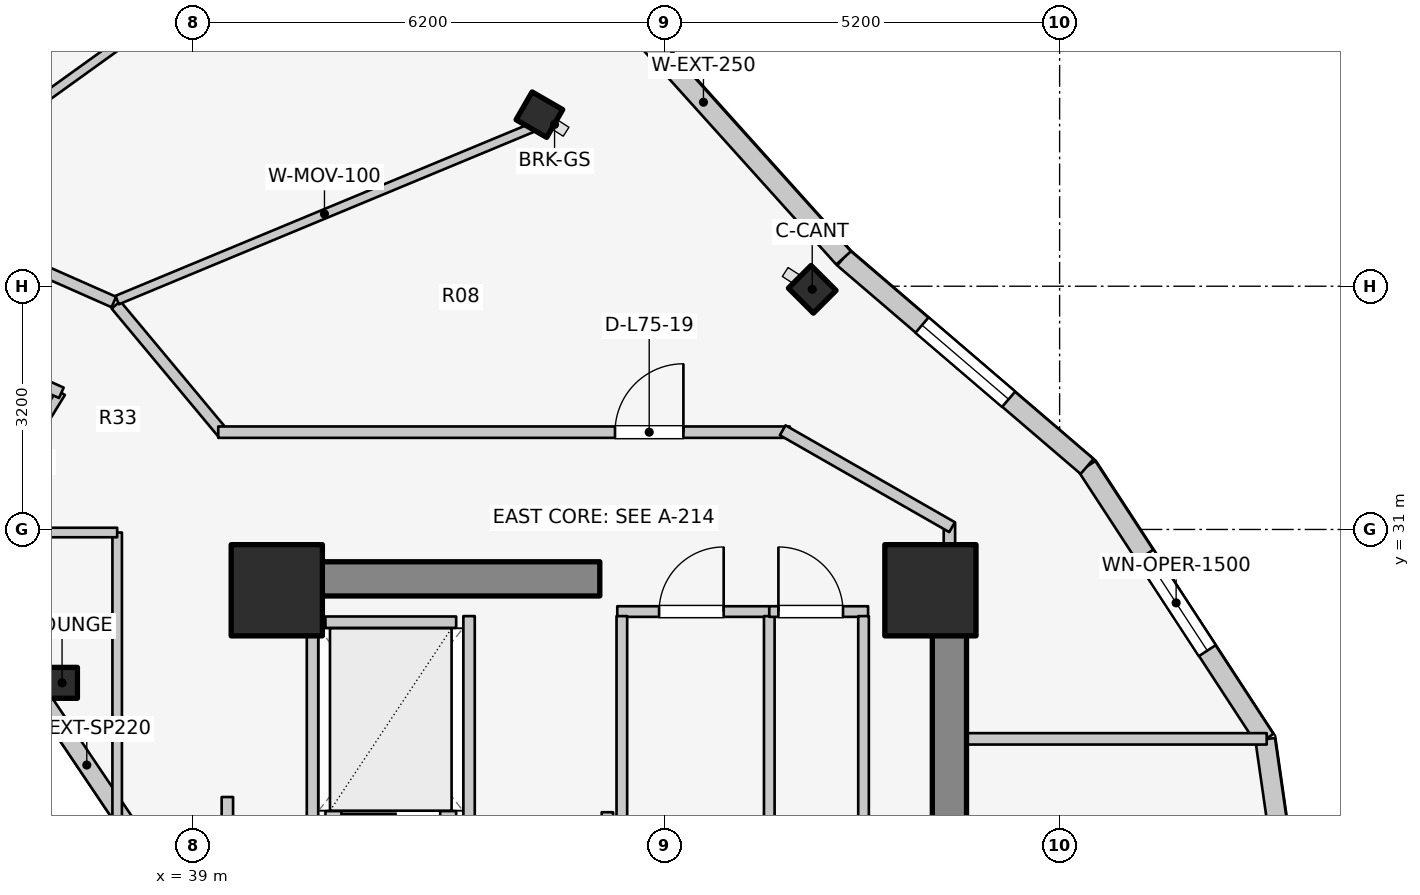
"""IFC4 building model, lengths in metres.
Left out: names, types, materials, properties, quantities, classifications, styles, units other than length and angle.
Written with IfcOpenShell. Run it as: python <this file> out.ifc"""

import sys

from ifc_helpers import new_model, si_unit, direction, frame, frame_2d, origin, origin_2d, place, context, subcontext, project, spatial, rectangle, i_section, extrude, element, fill, save


model = new_model("IFC4")
c1 = context("Model", 3, precision=1e-05, world=origin(), true_north=direction((0.0, 1.0)))
c2 = subcontext(c1, "Body", "Model", "MODEL_VIEW")
j1 = project(units=[si_unit("LENGTHUNIT", "METRE"), si_unit("PLANEANGLEUNIT", "RADIAN")], contexts=[c1])
p1 = place(None, origin())
s1 = spatial("IfcSite", under=j1, at=p1, CompositionType="ELEMENT")
p2 = place(p1, origin())
s2 = spatial("IfcBuilding", under=s1, at=p2, CompositionType="ELEMENT")
p3 = place(p2, frame((0.0, 0.0, 246.0)))
s3 = spatial("IfcBuildingStorey", under=s2, at=p3, CompositionType="ELEMENT", Elevation=246.0)
p4 = place(p3, frame((48.95, 17.05, 0.0), z_axis=(0.0, 0.0, 1.0), x_axis=(0.0, 1.0, 0.0)))
e1 = element("IfcWall", 1, at=p4, inside=s3, PredefinedType="SHEAR", context=c2, shape_type="SweptSolid", body=[
    extrude(rectangle(XDim=12.8, YDim=0.45, at=frame_2d((6.4, 0.0))), origin(), (0.0, 0.0, 1.0), 3.6),
])
p5 = place(p3, frame((39.85, 30.35, 0.0), z_axis=(0.0, 0.0, 1.0), x_axis=(1.0, 0.0, 0.0)))
e2 = element("IfcWall", 2, at=p5, inside=s3, PredefinedType="SHEAR", context=c2, shape_type="SweptSolid", body=[
    extrude(rectangle(XDim=4.5, YDim=0.45, at=frame_2d((2.25, 0.0))), origin(), (0.0, 0.0, 1.0), 3.6),
])
for number, where, z_axis, x_axis in (
    (3, (48.7, 30.2, 0.0), (0.0, 0.0, 1.0), (1.0, 0.0, 0.0)),
    (4, (40.1, 30.2, 0.0), (0.0, 0.0, 1.0), (1.0, 0.0, 0.0)),
):
    element("IfcColumn", number, at=place(p3, frame(where, z_axis=z_axis, x_axis=x_axis)), inside=s3, PredefinedType="COLUMN", context=c2, shape_type="SweptSolid", body=[
        extrude(rectangle(XDim=1.2, YDim=1.2, at=origin_2d()), origin(), (0.0, 0.0, 1.0), 3.6),
    ])
p6 = place(p3, frame((37.275, 28.982, 0.0), z_axis=(0.0, 0.0, 1.0), x_axis=(1.0, 0.0, 0.0)))
e5 = element("IfcColumn", 5, at=p6, inside=s3, PredefinedType="COLUMN", context=c2, shape_type="SweptSolid", body=[
    extrude(i_section(OverallWidth=0.404, OverallDepth=0.407, WebThickness=0.027, FlangeThickness=0.044, FilletRadius=0.025, at=origin_2d()), origin(), (0.0, 0.0, 1.0), 3.6),
])
for number, where, z_axis, x_axis in (
    (6, (47.145, 34.159, 0.0), (0.0, 0.0, 1.0), (0.707, 0.707, 0.0)),
    (7, (43.555, 36.457, 0.0), (0.0, 0.0, 1.0), (0.5, 0.866, 0.0)),
):
    element("IfcColumn", number, at=place(p3, frame(where, z_axis=z_axis, x_axis=x_axis)), inside=s3, PredefinedType="COLUMN", context=c2, shape_type="SweptSolid", body=[
        extrude(i_section(OverallWidth=0.422, OverallDepth=0.465, WebThickness=0.045, FlangeThickness=0.073, FilletRadius=0.025, at=origin_2d()), origin(), (0.0, 0.0, 1.0), 3.6),
    ])
p7 = place(p3, frame((38.166, 27.06, 0.0), z_axis=(0.0, 0.0, 1.0), x_axis=(-0.558197800898, 0.829707909492, 0.0)))
e8 = element("IfcWall", 8, at=p7, inside=s3, PredefinedType="STANDARD", context=c2, shape_type="SweptSolid", body=[
    extrude(rectangle(XDim=2.027, YDim=0.23, at=frame_2d((1.013, 0.0))), origin(), (0.0, 0.0, 1.0), 2.6),
])
p8 = place(p3, frame((53.86, 23.0, 0.0), z_axis=(0.0, 0.0, 1.0), x_axis=(-0.142712754019, 0.989764148593, 0.0)))
e9 = element("IfcWall", 9, at=p8, inside=s3, PredefinedType="STANDARD", context=c2, shape_type="SweptSolid", body=[
    extrude(rectangle(XDim=5.293, YDim=0.26, at=frame_2d((2.646, 0.0))), origin(), (0.0, 0.0, 1.0), 3.29),
])
p9 = place(p8, frame((1.447, 0.0, 0.75)))
e10 = element("IfcOpeningElement", 10, at=p9, cuts=e9, PredefinedType="OPENING", context=c2, shape_type="SweptSolid", body=[
    extrude(rectangle(XDim=2.4, YDim=1.7, at=frame_2d((1.2, 0.85))), frame((0.0, 0.14, 0.0), z_axis=(0.0, -1.0, 0.0), x_axis=(1.0, 0.0, 0.0)), (0.0, 0.0, 1.0), 0.28),
])
p10 = place(p3, frame((53.105, 28.239, 0.0), z_axis=(0.0, 0.0, 1.0), x_axis=(-0.546606419826, 0.837389647539, 0.0)))
e11 = element("IfcWall", 11, at=p10, inside=s3, PredefinedType="STANDARD", context=c2, shape_type="SweptSolid", body=[
    extrude(rectangle(XDim=4.288, YDim=0.26, at=frame_2d((2.144, 0.0))), origin(), (0.0, 0.0, 1.0), 3.29),
])
p11 = place(p10, frame((1.394, 0.0, 0.75)))
e12 = element("IfcOpeningElement", 12, at=p11, cuts=e11, PredefinedType="OPENING", context=c2, shape_type="SweptSolid", body=[
    extrude(rectangle(XDim=1.5, YDim=1.6, at=frame_2d((0.75, 0.8))), frame((0.0, 0.14, 0.0), z_axis=(0.0, -1.0, 0.0), x_axis=(1.0, 0.0, 0.0)), (0.0, 0.0, 1.0), 0.28),
])
p12 = place(p3, frame((50.761, 31.829, 0.0), z_axis=(0.0, 0.0, 1.0), x_axis=(-0.759587504333, 0.650405122413, 0.0)))
e13 = element("IfcWall", 13, at=p12, inside=s3, PredefinedType="STANDARD", context=c2, shape_type="SweptSolid", body=[
    extrude(rectangle(XDim=4.217, YDim=0.26, at=frame_2d((2.109, 0.0))), origin(), (0.0, 0.0, 1.0), 3.29),
])
p13 = place(p12, frame((1.359, 0.0, 0.75)))
e14 = element("IfcOpeningElement", 14, at=p13, cuts=e13, PredefinedType="OPENING", context=c2, shape_type="SweptSolid", body=[
    extrude(rectangle(XDim=1.5, YDim=1.6, at=frame_2d((0.75, 0.8))), frame((0.0, 0.14, 0.0), z_axis=(0.0, -1.0, 0.0), x_axis=(1.0, 0.0, 0.0)), (0.0, 0.0, 1.0), 0.28),
])
p14 = place(p3, frame((47.558, 34.572, 0.0), z_axis=(0.0, 0.0, 1.0), x_axis=(-0.668903560134, 0.743349196031, 0.0)))
e15 = element("IfcWall", 15, at=p14, inside=s3, PredefinedType="STANDARD", context=c2, shape_type="SweptSolid", body=[
    extrude(rectangle(XDim=5.513, YDim=0.26, at=frame_2d((2.756, 0.0))), origin(), (0.0, 0.0, 1.0), 3.29),
])
p15 = place(p3, frame((40.74, 27.22, 0.0), z_axis=(0.0, 0.0, 1.0), x_axis=(1.0, 0.0, 0.0)))
e16 = element("IfcWall", 16, at=p15, inside=s3, PredefinedType="SOLIDWALL", context=c2, shape_type="SweptSolid", body=[
    extrude(rectangle(XDim=1.72, YDim=0.15, at=frame_2d((0.86, 0.0))), origin(), (0.0, 0.0, 1.0), 3.295),
])
p16 = place(p15, frame((0.21, 0.0, 0.0)))
e17 = element("IfcOpeningElement", 17, at=p16, cuts=e16, PredefinedType="OPENING", context=c2, shape_type="SweptSolid", body=[
    extrude(rectangle(XDim=1.3, YDim=2.1, at=frame_2d((0.65, 1.05))), frame((0.0, 0.085, 0.0), z_axis=(0.0, -1.0, 0.0), x_axis=(1.0, 0.0, 0.0)), (0.0, 0.0, 1.0), 0.17),
])
p17 = place(p3, frame((40.74, 29.78, 0.0), z_axis=(0.0, 0.0, 1.0), x_axis=(1.0, 0.0, 0.0)))
e18 = element("IfcWall", 18, at=p17, inside=s3, PredefinedType="SOLIDWALL", context=c2, shape_type="SweptSolid", body=[
    extrude(rectangle(XDim=1.72, YDim=0.15, at=frame_2d((0.86, 0.0))), origin(), (0.0, 0.0, 1.0), 3.295),
])
for number, where, z_axis, x_axis in (
    (19, (40.57, 27.14, 0.0), (0.0, 0.0, 1.0), (0.0, 1.0, 0.0)),
    (20, (42.63, 27.14, 0.0), (0.0, 0.0, 1.0), (0.0, 1.0, 0.0)),
):
    element("IfcWall", number, at=place(p3, frame(where, z_axis=z_axis, x_axis=x_axis)), inside=s3, PredefinedType="SOLIDWALL", context=c2, shape_type="SweptSolid", body=[
        extrude(rectangle(XDim=2.72, YDim=0.15, at=frame_2d((1.36, 0.0))), origin(), (0.0, 0.0, 1.0), 3.295),
    ])
p18 = place(p3, frame((44.45, 24.08, 0.0), z_axis=(0.0, 0.0, 1.0), x_axis=(0.0, 1.0, 0.0)))
e21 = element("IfcWall", 21, at=p18, inside=s3, PredefinedType="PARTITIONING", context=c2, shape_type="SweptSolid", body=[
    extrude(rectangle(XDim=3.2, YDim=0.15, at=frame_2d((1.6, 0.0))), origin(), (0.0, 0.0, 1.0), 3.295),
])
p19 = place(p3, frame((39.45, 24.08, 0.0), z_axis=(0.0, 0.0, 1.0), x_axis=(0.0, 1.0, 0.0)))
e22 = element("IfcWall", 22, at=p19, inside=s3, PredefinedType="PARTITIONING", context=c2, shape_type="SweptSolid", body=[
    extrude(rectangle(XDim=3.4, YDim=0.15, at=frame_2d((1.7, 0.0))), origin(), (0.0, 0.0, 1.0), 3.295),
])
p20 = place(p19, frame((2.02, 0.0, 0.0)))
e23 = element("IfcOpeningElement", 23, at=p20, cuts=e22, PredefinedType="OPENING", context=c2, shape_type="SweptSolid", body=[
    extrude(rectangle(XDim=1.1, YDim=2.1, at=frame_2d((0.55, 1.05))), frame((0.0, 0.085, 0.0), z_axis=(0.0, -1.0, 0.0), x_axis=(1.0, 0.0, 0.0)), (0.0, 0.0, 1.0), 0.17),
])
p21 = place(p3, frame((44.58, 29.92, 0.0), z_axis=(0.0, 0.0, 1.0), x_axis=(1.0, 0.0, 0.0)))
e24 = element("IfcWall", 24, at=p21, inside=s3, PredefinedType="PLUMBINGWALL", context=c2, shape_type="SweptSolid", body=[
    extrude(rectangle(XDim=2.0, YDim=0.14, at=frame_2d((1.0, 0.0))), origin(), (0.0, 0.0, 1.0), 3.295),
])
p22 = place(p21, frame((0.55, 0.0, 0.0)))
e25 = element("IfcOpeningElement", 25, at=p22, cuts=e24, PredefinedType="OPENING", context=c2, shape_type="SweptSolid", body=[
    extrude(rectangle(XDim=0.85, YDim=2.05, at=frame_2d((0.425, 1.025))), frame((0.0, 0.08, 0.0), z_axis=(0.0, -1.0, 0.0), x_axis=(1.0, 0.0, 0.0)), (0.0, 0.0, 1.0), 0.16),
])
for number, where, z_axis, x_axis in (
    (26, (44.64, 25.98, 0.0), (0.0, 0.0, 1.0), (0.0, 1.0, 0.0)),
    (27, (46.58, 25.98, 0.0), (0.0, 0.0, 1.0), (0.0, 1.0, 0.0)),
):
    element("IfcWall", number, at=place(p3, frame(where, z_axis=z_axis, x_axis=x_axis)), inside=s3, PredefinedType="PLUMBINGWALL", context=c2, shape_type="SweptSolid", body=[
        extrude(rectangle(XDim=3.88, YDim=0.14, at=frame_2d((1.94, 0.0))), origin(), (0.0, 0.0, 1.0), 3.295),
    ])
p23 = place(p3, frame((46.58, 29.92, 0.0), z_axis=(0.0, 0.0, 1.0), x_axis=(1.0, 0.0, 0.0)))
e28 = element("IfcWall", 28, at=p23, inside=s3, PredefinedType="PLUMBINGWALL", context=c2, shape_type="SweptSolid", body=[
    extrude(rectangle(XDim=1.3, YDim=0.14, at=frame_2d((0.65, 0.0))), origin(), (0.0, 0.0, 1.0), 3.295),
])
p24 = place(p23, frame((0.12, 0.0, 0.0)))
e29 = element("IfcOpeningElement", 29, at=p24, cuts=e28, PredefinedType="OPENING", context=c2, shape_type="SweptSolid", body=[
    extrude(rectangle(XDim=0.85, YDim=2.05, at=frame_2d((0.425, 1.025))), frame((0.0, 0.08, 0.0), z_axis=(0.0, -1.0, 0.0), x_axis=(1.0, 0.0, 0.0)), (0.0, 0.0, 1.0), 0.16),
])
p25 = place(p3, frame((47.82, 25.98, 0.0), z_axis=(0.0, 0.0, 1.0), x_axis=(0.0, 1.0, 0.0)))
e30 = element("IfcWall", 30, at=p25, inside=s3, PredefinedType="PLUMBINGWALL", context=c2, shape_type="SweptSolid", body=[
    extrude(rectangle(XDim=3.88, YDim=0.14, at=frame_2d((1.94, 0.0))), origin(), (0.0, 0.0, 1.0), 3.295),
])
p26 = place(p3, frame((35.55, 30.015, 0.0), z_axis=(0.0, 0.0, 1.0), x_axis=(0.522763432117, 0.852477796802, 0.0)))
e31 = element("IfcWall", 31, at=p26, inside=s3, PredefinedType="PARTITIONING", context=c2, shape_type="SweptSolid", body=[
    extrude(rectangle(XDim=3.269, YDim=0.125, at=frame_2d((1.635, 0.0))), origin(), (0.0, 0.0, 1.0), 2.672),
])
p27 = place(p3, frame((37.265, 32.798, 0.0), z_axis=(0.0, 0.0, 1.0), x_axis=(-0.913254317828, 0.407389924971, 0.0)))
e32 = element("IfcWall", 32, at=p27, inside=s3, PredefinedType="PARTITIONING", context=c2, shape_type="SweptSolid", body=[
    extrude(rectangle(XDim=2.787, YDim=0.15, at=frame_2d((1.393, 0.0))), origin(), (0.0, 0.0, 1.0), 2.823),
])
p28 = place(p3, frame((38.0, 25.8, 0.0), z_axis=(0.0, 0.0, 1.0), x_axis=(0.0, 1.0, 0.0)))
e33 = element("IfcWall", 33, at=p28, inside=s3, PredefinedType="PARTITIONING", context=c2, shape_type="SweptSolid", body=[
    extrude(rectangle(XDim=5.16, YDim=0.125, at=frame_2d((2.58, 0.0))), origin(), (0.0, 0.0, 1.0), 2.672),
])
p29 = place(p3, frame((35.4, 30.96, 0.0), z_axis=(0.0, 0.0, 1.0), x_axis=(1.0, 0.0, 0.0)))
e34 = element("IfcWall", 34, at=p29, inside=s3, PredefinedType="PARTITIONING", context=c2, shape_type="SweptSolid", body=[
    extrude(rectangle(XDim=2.6, YDim=0.125, at=frame_2d((1.3, 0.0))), origin(), (0.0, 0.0, 1.0), 2.816),
])
p30 = place(p3, frame((48.95, 28.245, 0.0), z_axis=(0.0, 0.0, 1.0), x_axis=(1.0, 0.0, 0.0)))
e35 = element("IfcWall", 35, at=p30, inside=s3, PredefinedType="PARTITIONING", context=c2, shape_type="SweptSolid", body=[
    extrude(rectangle(XDim=4.175, YDim=0.15, at=frame_2d((2.087, 0.0))), origin(), (0.0, 0.0, 1.0), 3.295),
])
p31 = place(p3, frame((48.95, 29.8, 0.0), z_axis=(0.0, 0.0, 1.0), x_axis=(0.0, 1.0, 0.0)))
e36 = element("IfcWall", 36, at=p31, inside=s3, PredefinedType="PARTITIONING", context=c2, shape_type="SweptSolid", body=[
    extrude(rectangle(XDim=1.29, YDim=0.15, at=frame_2d((0.645, 0.0))), origin(), (0.0, 0.0, 1.0), 3.295),
])
p32 = place(p3, frame((37.984, 33.955, 0.0), z_axis=(0.0, 0.0, 1.0), x_axis=(0.64030392053, -0.76812166312, 0.0)))
e37 = element("IfcWall", 37, at=p32, inside=s3, PredefinedType="PARTITIONING", context=c2, shape_type="SweptSolid", body=[
    extrude(rectangle(XDim=2.21, YDim=0.15, at=frame_2d((1.105, 0.0))), origin(), (0.0, 0.0, 1.0), 2.816),
])
p33 = place(p3, frame((39.33, 32.28, 0.0), z_axis=(0.0, 0.0, 1.0), x_axis=(1.0, 0.0, 0.0)))
e38 = element("IfcWall", 38, at=p33, inside=s3, PredefinedType="PARTITIONING", context=c2, shape_type="SweptSolid", body=[
    extrude(rectangle(XDim=7.52, YDim=0.15, at=frame_2d((3.76, 0.0))), origin(), (0.0, 0.0, 1.0), 2.816),
])
p34 = place(p33, frame((5.22, 0.0, 0.0)))
e39 = element("IfcOpeningElement", 39, at=p34, cuts=e38, PredefinedType="OPENING", context=c2, shape_type="SweptSolid", body=[
    extrude(rectangle(XDim=0.9, YDim=2.1, at=frame_2d((0.45, 1.05))), frame((0.0, 0.085, 0.0), z_axis=(0.0, -1.0, 0.0), x_axis=(1.0, 0.0, 0.0)), (0.0, 0.0, 1.0), 0.17),
])
p35 = place(p3, frame((46.757, 32.305, 0.0), z_axis=(0.0, 0.0, 1.0), x_axis=(0.867991349648, -0.496579315857, 0.0)))
e40 = element("IfcWall", 40, at=p35, inside=s3, PredefinedType="PARTITIONING", context=c2, shape_type="SweptSolid", body=[
    extrude(rectangle(XDim=2.567, YDim=0.15, at=frame_2d((1.283, 0.0))), origin(), (0.0, 0.0, 1.0), 2.66),
])
p36 = place(p3, frame((38.0, 34.018, 0.0), z_axis=(0.0, 0.0, 1.0), x_axis=(0.92349333748, 0.383614462228, 0.0)))
e41 = element("IfcWall", 41, at=p36, inside=s3, PredefinedType="MOVABLE", context=c2, shape_type="SweptSolid", body=[
    extrude(rectangle(XDim=5.907, YDim=0.12, at=frame_2d((2.954, 0.0))), origin(), (0.0, 0.0, 1.0), 2.66),
])
p37 = place(p3, frame((35.124, 35.297, 0.0), z_axis=(0.0, 0.0, 1.0), x_axis=(0.811745719064, 0.584011033783, 0.0)))
e42 = element("IfcWall", 42, at=p37, inside=s3, PredefinedType="MOVABLE", context=c2, shape_type="SweptSolid", body=[
    extrude(rectangle(XDim=4.534, YDim=0.12, at=frame_2d((2.267, 0.0))), origin(), (0.0, 0.0, 1.0), 2.66),
])
p38 = place(p3, frame((37.956, 33.992, 0.0), z_axis=(0.0, 0.0, 1.0), x_axis=(-0.914642679993, 0.404263240891, 0.0)))
e43 = element("IfcWall", 43, at=p38, inside=s3, PredefinedType="PARTITIONING", context=c2, shape_type="SweptSolid", body=[
    extrude(rectangle(XDim=3.154, YDim=0.15, at=frame_2d((1.577, 0.0))), origin(), (0.0, 0.0, 1.0), 2.823),
])
p39 = place(p38, frame((1.102, 0.0, 0.0)))
e44 = element("IfcOpeningElement", 44, at=p39, cuts=e43, PredefinedType="OPENING", context=c2, shape_type="SweptSolid", body=[
    extrude(rectangle(XDim=0.95, YDim=2.1, at=frame_2d((0.475, 1.05))), frame((0.0, 0.085, 0.0), z_axis=(0.0, -1.0, 0.0), x_axis=(1.0, 0.0, 0.0)), (0.0, 0.0, 1.0), 0.17),
])
p40 = place(p11, origin())
e45 = element("IfcWindow", 45, at=p40, inside=s3, PartitioningType="SINGLE_PANEL", PredefinedType="WINDOW", context=c2, shape_type="SweptSolid", body=[
    extrude(rectangle(XDim=1.5, YDim=1.6, at=frame_2d((0.75, 0.8))), frame((0.0, 0.03, 0.0), z_axis=(0.0, -1.0, 0.0), x_axis=(1.0, 0.0, 0.0)), (0.0, 0.0, 1.0), 0.06),
])
fill(e12, e45)
p41 = place(p13, origin())
e46 = element("IfcWindow", 46, at=p41, inside=s3, PartitioningType="SINGLE_PANEL", PredefinedType="WINDOW", context=c2, shape_type="SweptSolid", body=[
    extrude(rectangle(XDim=1.5, YDim=1.6, at=frame_2d((0.75, 0.8))), frame((0.0, 0.03, 0.0), z_axis=(0.0, -1.0, 0.0), x_axis=(1.0, 0.0, 0.0)), (0.0, 0.0, 1.0), 0.06),
])
fill(e14, e46)
p42 = place(p22, origin())
e47 = element("IfcDoor", 47, at=p42, inside=s3, OperationType="SINGLE_SWING_RIGHT", PredefinedType="DOOR", context=c2, shape_type="SweptSolid", body=[
    extrude(rectangle(XDim=0.85, YDim=2.05, at=frame_2d((0.425, 1.025))), frame((0.0, 0.025, 0.0), z_axis=(0.0, -1.0, 0.0), x_axis=(1.0, 0.0, 0.0)), (0.0, 0.0, 1.0), 0.05),
])
fill(e25, e47)
p43 = place(p24, origin())
e48 = element("IfcDoor", 48, at=p43, inside=s3, OperationType="SINGLE_SWING_LEFT", PredefinedType="DOOR", context=c2, shape_type="SweptSolid", body=[
    extrude(rectangle(XDim=0.85, YDim=2.05, at=frame_2d((0.425, 1.025))), frame((0.0, 0.025, 0.0), z_axis=(0.0, -1.0, 0.0), x_axis=(1.0, 0.0, 0.0)), (0.0, 0.0, 1.0), 0.05),
])
fill(e29, e48)
p44 = place(p34, origin())
e49 = element("IfcDoor", 49, at=p44, inside=s3, OperationType="SINGLE_SWING_RIGHT", PredefinedType="DOOR", context=c2, shape_type="SweptSolid", body=[
    extrude(rectangle(XDim=0.9, YDim=2.1, at=frame_2d((0.45, 1.05))), frame((0.0, 0.025, 0.0), z_axis=(0.0, -1.0, 0.0), x_axis=(1.0, 0.0, 0.0)), (0.0, 0.0, 1.0), 0.05),
])
fill(e39, e49)
save(model, sys.argv[1])
